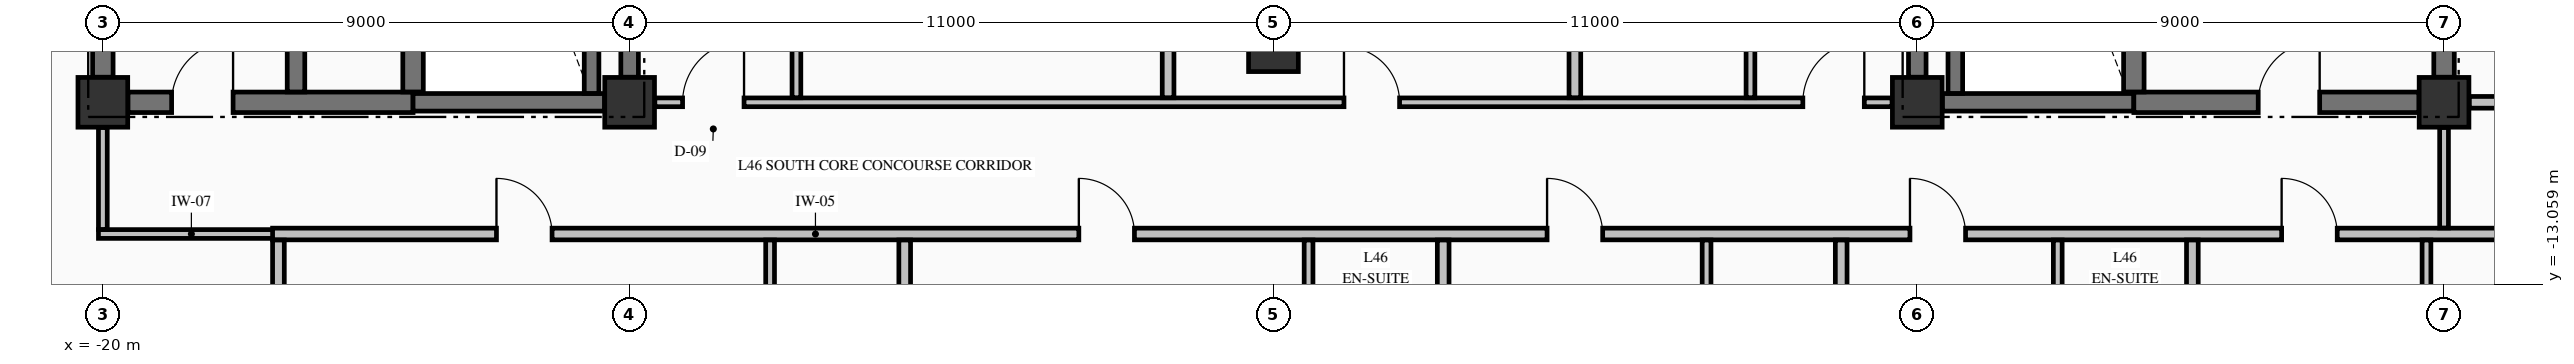
"""IFC4 building model, lengths in metres.
Left out: names, types, materials, properties, quantities, classifications, styles, units other than length and angle.
Written with IfcOpenShell. Run it as: python <this file> out.ifc"""

import sys

from ifc_helpers import new_model, si_unit, direction, frame, frame_2d, origin, origin_2d, place, context, subcontext, project, spatial, rectangle, extrude, element, fill, save


model = new_model("IFC4")
c1 = context("Model", 3, precision=1e-05, world=origin(), true_north=direction((0.0, 1.0)))
c2 = subcontext(c1, "Body", "Model", "MODEL_VIEW")
j1 = project(units=[si_unit("LENGTHUNIT", "METRE"), si_unit("PLANEANGLEUNIT", "RADIAN")], contexts=[c1])
p1 = place(None, origin())
s1 = spatial("IfcSite", under=j1, at=p1, CompositionType="ELEMENT")
p2 = place(p1, origin())
s2 = spatial("IfcBuilding", under=s1, at=p2, CompositionType="ELEMENT")
p3 = place(p2, frame((0.0, 0.0, 179.66)))
s3 = spatial("IfcBuildingStorey", under=s2, at=p3, CompositionType="ELEMENT", Elevation=179.66)
for number, where, z_axis, x_axis in (
    (1, (-20.0, -9.95, -0.25), (0.0, 0.0, 1.0), (1.0, 0.0, 0.0)),
    (2, (-11.0, -9.95, -0.25), (0.0, 0.0, 1.0), (1.0, 0.0, 0.0)),
    (3, (11.0, -9.95, -0.25), (0.0, 0.0, 1.0), (1.0, 0.0, 0.0)),
    (4, (20.0, -9.95, -0.25), (0.0, 0.0, 1.0), (1.0, 0.0, 0.0)),
    (5, (0.0, -9.0, -0.25), (0.0, 0.0, 1.0), (1.0, 0.0, 0.0)),
):
    element("IfcColumn", number, at=place(p3, frame(where, z_axis=z_axis, x_axis=x_axis)), inside=s3, PredefinedType="COLUMN", context=c2, shape_type="SweptSolid", body=[
        extrude(rectangle(XDim=0.85, YDim=0.85, at=origin_2d()), origin(), (0.0, 0.0, 1.0), 3.4),
    ])
p4 = place(p3, frame((-19.571, -9.95, 0.0), z_axis=(0.0, 0.0, 1.0), x_axis=(1.0, 0.0, 0.0)))
e6 = element("IfcWall", 6, at=p4, inside=s3, PredefinedType="SHEAR", context=c2, shape_type="SweptSolid", body=[
    extrude(rectangle(XDim=4.871, YDim=0.35, at=frame_2d((2.436, 0.0))), origin(), (0.0, 0.0, 1.0), 3.15),
])
p5 = place(p4, frame((0.746, 0.0, 0.0)))
e7 = element("IfcOpeningElement", 7, at=p5, cuts=e6, PredefinedType="OPENING", context=c2, shape_type="SweptSolid", body=[
    extrude(rectangle(XDim=1.05, YDim=2.15, at=frame_2d((0.525, 1.075))), frame((0.0, 0.185, 0.0), z_axis=(0.0, -1.0, 0.0), x_axis=(1.0, 0.0, 0.0)), (0.0, 0.0, 1.0), 0.37),
])
for number, where, z_axis, x_axis in (
    (8, (-14.7, -9.95, 0.0), (0.0, 0.0, 1.0), (1.0, 0.0, 0.0)),
    (9, (11.429, -9.95, 0.0), (0.0, 0.0, 1.0), (1.0, 0.0, 0.0)),
):
    element("IfcWall", number, at=place(p3, frame(where, z_axis=z_axis, x_axis=x_axis)), inside=s3, PredefinedType="SHEAR", context=c2, shape_type="SweptSolid", body=[
        extrude(rectangle(XDim=3.271, YDim=0.3, at=frame_2d((1.635, 0.0))), origin(), (0.0, 0.0, 1.0), 3.15),
    ])
p6 = place(p3, frame((14.7, -9.95, 0.0), z_axis=(0.0, 0.0, 1.0), x_axis=(1.0, 0.0, 0.0)))
e10 = element("IfcWall", 10, at=p6, inside=s3, PredefinedType="SHEAR", context=c2, shape_type="SweptSolid", body=[
    extrude(rectangle(XDim=4.871, YDim=0.35, at=frame_2d((2.436, 0.0))), origin(), (0.0, 0.0, 1.0), 3.15),
])
p7 = place(p6, frame((2.125, 0.0, 0.0)))
e11 = element("IfcOpeningElement", 11, at=p7, cuts=e10, PredefinedType="OPENING", context=c2, shape_type="SweptSolid", body=[
    extrude(rectangle(XDim=1.05, YDim=2.15, at=frame_2d((0.525, 1.075))), frame((0.0, 0.185, 0.0), z_axis=(0.0, -1.0, 0.0), x_axis=(1.0, 0.0, 0.0)), (0.0, 0.0, 1.0), 0.37),
])
p8 = place(p3, frame((-20.075, -12.2, 0.0), z_axis=(0.0, 0.0, 1.0), x_axis=(1.0, 0.0, 0.0)))
e12 = element("IfcWall", 12, at=p8, inside=s3, PredefinedType="PARTITIONING", context=c2, shape_type="SweptSolid", body=[
    extrude(rectangle(XDim=3.175, YDim=0.15, at=frame_2d((1.587, 0.0))), origin(), (0.0, 0.0, 1.0), 3.15),
])
p9 = place(p3, frame((-17.1, -12.2, 0.0), z_axis=(0.0, 0.0, 1.0), x_axis=(1.0, 0.0, 0.0)))
e13 = element("IfcWall", 13, at=p9, inside=s3, PredefinedType="PARTITIONING", context=c2, shape_type="SweptSolid", body=[
    extrude(rectangle(XDim=39.2, YDim=0.2, at=frame_2d((19.6, 0.0))), origin(), (0.0, 0.0, 1.0), 3.15),
])
p10 = place(p9, frame((3.825, 0.0, 0.0)))
e14 = element("IfcOpeningElement", 14, at=p10, cuts=e13, PredefinedType="OPENING", context=c2, shape_type="SweptSolid", body=[
    extrude(rectangle(XDim=0.95, YDim=2.15, at=frame_2d((0.475, 1.075))), frame((0.0, 0.11, 0.0), z_axis=(0.0, -1.0, 0.0), x_axis=(1.0, 0.0, 0.0)), (0.0, 0.0, 1.0), 0.22),
])
p11 = place(p9, frame((13.775, 0.0, 0.0)))
e15 = element("IfcOpeningElement", 15, at=p11, cuts=e13, PredefinedType="OPENING", context=c2, shape_type="SweptSolid", body=[
    extrude(rectangle(XDim=0.95, YDim=2.15, at=frame_2d((0.475, 1.075))), frame((0.0, 0.11, 0.0), z_axis=(0.0, -1.0, 0.0), x_axis=(1.0, 0.0, 0.0)), (0.0, 0.0, 1.0), 0.22),
])
p12 = place(p9, frame((21.775, 0.0, 0.0)))
e16 = element("IfcOpeningElement", 16, at=p12, cuts=e13, PredefinedType="OPENING", context=c2, shape_type="SweptSolid", body=[
    extrude(rectangle(XDim=0.95, YDim=2.15, at=frame_2d((0.475, 1.075))), frame((0.0, 0.11, 0.0), z_axis=(0.0, -1.0, 0.0), x_axis=(1.0, 0.0, 0.0)), (0.0, 0.0, 1.0), 0.22),
])
p13 = place(p9, frame((27.975, 0.0, 0.0)))
e17 = element("IfcOpeningElement", 17, at=p13, cuts=e13, PredefinedType="OPENING", context=c2, shape_type="SweptSolid", body=[
    extrude(rectangle(XDim=0.95, YDim=2.15, at=frame_2d((0.475, 1.075))), frame((0.0, 0.11, 0.0), z_axis=(0.0, -1.0, 0.0), x_axis=(1.0, 0.0, 0.0)), (0.0, 0.0, 1.0), 0.22),
])
p14 = place(p9, frame((34.325, 0.0, 0.0)))
e18 = element("IfcOpeningElement", 18, at=p14, cuts=e13, PredefinedType="OPENING", context=c2, shape_type="SweptSolid", body=[
    extrude(rectangle(XDim=0.95, YDim=2.15, at=frame_2d((0.475, 1.075))), frame((0.0, 0.11, 0.0), z_axis=(0.0, -1.0, 0.0), x_axis=(1.0, 0.0, 0.0)), (0.0, 0.0, 1.0), 0.22),
])
p15 = place(p3, frame((-10.569, -9.95, 0.0), z_axis=(0.0, 0.0, 1.0), x_axis=(1.0, 0.0, 0.0)))
e19 = element("IfcWall", 19, at=p15, inside=s3, PredefinedType="PARTITIONING", context=c2, shape_type="SweptSolid", body=[
    extrude(rectangle(XDim=21.138, YDim=0.15, at=frame_2d((10.569, 0.0))), origin(), (0.0, 0.0, 1.0), 3.15),
])
p16 = place(p15, frame((0.474, 0.0, 0.0)))
e20 = element("IfcOpeningElement", 20, at=p16, cuts=e19, PredefinedType="OPENING", context=c2, shape_type="SweptSolid", body=[
    extrude(rectangle(XDim=1.05, YDim=2.15, at=frame_2d((0.525, 1.075))), frame((0.0, 0.085, 0.0), z_axis=(0.0, -1.0, 0.0), x_axis=(1.0, 0.0, 0.0)), (0.0, 0.0, 1.0), 0.17),
])
p17 = place(p15, frame((19.614, 0.0, 0.0)))
e21 = element("IfcOpeningElement", 21, at=p17, cuts=e19, PredefinedType="OPENING", context=c2, shape_type="SweptSolid", body=[
    extrude(rectangle(XDim=1.05, YDim=2.15, at=frame_2d((0.525, 1.075))), frame((0.0, 0.085, 0.0), z_axis=(0.0, -1.0, 0.0), x_axis=(1.0, 0.0, 0.0)), (0.0, 0.0, 1.0), 0.17),
])
p18 = place(p15, frame((11.774, 0.0, 0.0)))
e22 = element("IfcOpeningElement", 22, at=p18, cuts=e19, PredefinedType="OPENING", context=c2, shape_type="SweptSolid", body=[
    extrude(rectangle(XDim=0.95, YDim=2.15, at=frame_2d((0.475, 1.075))), frame((0.0, 0.085, 0.0), z_axis=(0.0, -1.0, 0.0), x_axis=(1.0, 0.0, 0.0)), (0.0, 0.0, 1.0), 0.17),
])
p19 = place(p3, frame((20.431, -9.95, 0.0), z_axis=(0.0, 0.0, 1.0), x_axis=(1.0, 0.0, 0.0)))
e23 = element("IfcWall", 23, at=p19, inside=s3, PredefinedType="PARTITIONING", context=c2, shape_type="SweptSolid", body=[
    extrude(rectangle(XDim=6.404, YDim=0.2, at=frame_2d((3.202, 0.0))), origin(), (0.0, 0.0, 1.0), 3.15),
])
p20 = place(p3, frame((-20.0, -9.521, 0.0), z_axis=(0.0, 0.0, 1.0), x_axis=(0.0, 1.0, 0.0)))
e24 = element("IfcWall", 24, at=p20, inside=s3, PredefinedType="SHEAR", context=c2, shape_type="SweptSolid", body=[
    extrude(rectangle(XDim=9.092, YDim=0.35, at=frame_2d((4.546, 0.0))), origin(), (0.0, 0.0, 1.0), 3.15),
])
p21 = place(p3, frame((-16.7, -9.773, 0.0), z_axis=(0.0, 0.0, 1.0), x_axis=(0.0, 1.0, 0.0)))
e25 = element("IfcWall", 25, at=p21, inside=s3, PredefinedType="SHEAR", context=c2, shape_type="SweptSolid", body=[
    extrude(rectangle(XDim=9.371, YDim=0.3, at=frame_2d((4.686, 0.0))), origin(), (0.0, 0.0, 1.0), 3.15),
])
p22 = place(p3, frame((-14.7, -9.773, 0.0), z_axis=(0.0, 0.0, 1.0), x_axis=(0.0, 1.0, 0.0)))
e26 = element("IfcWall", 26, at=p22, inside=s3, PredefinedType="SHEAR", context=c2, shape_type="SweptSolid", body=[
    extrude(rectangle(XDim=9.371, YDim=0.35, at=frame_2d((4.686, 0.0))), origin(), (0.0, 0.0, 1.0), 3.15),
])
p23 = place(p3, frame((-11.65, -9.798, 0.0), z_axis=(0.0, 0.0, 1.0), x_axis=(0.0, 1.0, 0.0)))
e27 = element("IfcWall", 27, at=p23, inside=s3, PredefinedType="SOLIDWALL", context=c2, shape_type="SweptSolid", body=[
    extrude(rectangle(XDim=9.396, YDim=0.25, at=frame_2d((4.698, 0.0))), origin(), (0.0, 0.0, 1.0), 3.15),
])
for number, where, z_axis, x_axis in (
    (28, (-11.0, -9.521, 0.0), (0.0, 0.0, 1.0), (0.0, 1.0, 0.0)),
    (29, (11.0, -9.521, 0.0), (0.0, 0.0, 1.0), (0.0, 1.0, 0.0)),
):
    element("IfcWall", number, at=place(p3, frame(where, z_axis=z_axis, x_axis=x_axis)), inside=s3, PredefinedType="SHEAR", context=c2, shape_type="SweptSolid", body=[
        extrude(rectangle(XDim=9.092, YDim=0.3, at=frame_2d((4.546, 0.0))), origin(), (0.0, 0.0, 1.0), 3.15),
    ])
p24 = place(p3, frame((11.65, -9.798, 0.0), z_axis=(0.0, 0.0, 1.0), x_axis=(0.0, 1.0, 0.0)))
e30 = element("IfcWall", 30, at=p24, inside=s3, PredefinedType="SOLIDWALL", context=c2, shape_type="SweptSolid", body=[
    extrude(rectangle(XDim=9.396, YDim=0.25, at=frame_2d((4.698, 0.0))), origin(), (0.0, 0.0, 1.0), 3.15),
])
p25 = place(p3, frame((14.7, -9.773, 0.0), z_axis=(0.0, 0.0, 1.0), x_axis=(0.0, 1.0, 0.0)))
e31 = element("IfcWall", 31, at=p25, inside=s3, PredefinedType="SHEAR", context=c2, shape_type="SweptSolid", body=[
    extrude(rectangle(XDim=9.371, YDim=0.35, at=frame_2d((4.686, 0.0))), origin(), (0.0, 0.0, 1.0), 3.15),
])
p26 = place(p3, frame((20.0, -9.521, 0.0), z_axis=(0.0, 0.0, 1.0), x_axis=(0.0, 1.0, 0.0)))
e32 = element("IfcWall", 32, at=p26, inside=s3, PredefinedType="SHEAR", context=c2, shape_type="SweptSolid", body=[
    extrude(rectangle(XDim=9.092, YDim=0.35, at=frame_2d((4.546, 0.0))), origin(), (0.0, 0.0, 1.0), 3.15),
])
p27 = place(p3, frame((-20.0, -12.122, 0.0), z_axis=(0.0, 0.0, 1.0), x_axis=(0.0, 1.0, 0.0)))
e33 = element("IfcWall", 33, at=p27, inside=s3, PredefinedType="PARTITIONING", context=c2, shape_type="SweptSolid", body=[
    extrude(rectangle(XDim=1.741, YDim=0.15, at=frame_2d((0.871, 0.0))), origin(), (0.0, 0.0, 1.0), 2.342),
])
p28 = place(p3, frame((-17.0, -18.994, 0.0), z_axis=(0.0, 0.0, 1.0), x_axis=(0.0, 1.0, 0.0)))
e34 = element("IfcWall", 34, at=p28, inside=s3, PredefinedType="PARTITIONING", context=c2, shape_type="SweptSolid", body=[
    extrude(rectangle(XDim=6.691, YDim=0.2, at=frame_2d((3.345, 0.0))), origin(), (0.0, 0.0, 1.0), 3.15),
])
p29 = place(p3, frame((-8.6, -14.372, 0.0), z_axis=(0.0, 0.0, 1.0), x_axis=(0.0, 1.0, 0.0)))
e35 = element("IfcWall", 35, at=p29, inside=s3, PredefinedType="PARTITIONING", context=c2, shape_type="SweptSolid", body=[
    extrude(rectangle(XDim=2.069, YDim=0.15, at=frame_2d((1.035, 0.0))), origin(), (0.0, 0.0, 1.0), 3.15),
])
p30 = place(p3, frame((-8.15, -9.872, 0.0), z_axis=(0.0, 0.0, 1.0), x_axis=(0.0, 1.0, 0.0)))
e36 = element("IfcWall", 36, at=p30, inside=s3, PredefinedType="PARTITIONING", context=c2, shape_type="SweptSolid", body=[
    extrude(rectangle(XDim=10.569, YDim=0.15, at=frame_2d((5.285, 0.0))), origin(), (0.0, 0.0, 1.0), 3.15),
])
p31 = place(p30, frame((4.802, 0.0, 0.0)))
e37 = element("IfcOpeningElement", 37, at=p31, cuts=e36, PredefinedType="OPENING", context=c2, shape_type="SweptSolid", body=[
    extrude(rectangle(XDim=1.0, YDim=2.15, at=frame_2d((0.5, 1.075))), frame((0.0, 0.085, 0.0), z_axis=(0.0, -1.0, 0.0), x_axis=(1.0, 0.0, 0.0)), (0.0, 0.0, 1.0), 0.17),
])
p32 = place(p3, frame((-6.3, -14.372, 0.0), z_axis=(0.0, 0.0, 1.0), x_axis=(0.0, 1.0, 0.0)))
e38 = element("IfcWall", 38, at=p32, inside=s3, PredefinedType="PARTITIONING", context=c2, shape_type="SweptSolid", body=[
    extrude(rectangle(XDim=2.069, YDim=0.2, at=frame_2d((1.035, 0.0))), origin(), (0.0, 0.0, 1.0), 3.15),
])
p33 = place(p3, frame((-1.8, -9.872, 0.0), z_axis=(0.0, 0.0, 1.0), x_axis=(0.0, 1.0, 0.0)))
e39 = element("IfcWall", 39, at=p33, inside=s3, PredefinedType="PARTITIONING", context=c2, shape_type="SweptSolid", body=[
    extrude(rectangle(XDim=4.569, YDim=0.2, at=frame_2d((2.285, 0.0))), origin(), (0.0, 0.0, 1.0), 3.15),
])
p34 = place(p3, frame((0.6, -15.072, 0.0), z_axis=(0.0, 0.0, 1.0), x_axis=(0.0, 1.0, 0.0)))
e40 = element("IfcWall", 40, at=p34, inside=s3, PredefinedType="PARTITIONING", context=c2, shape_type="SweptSolid", body=[
    extrude(rectangle(XDim=2.769, YDim=0.15, at=frame_2d((1.385, 0.0))), origin(), (0.0, 0.0, 1.0), 3.15),
])
p35 = place(p3, frame((2.9, -15.072, 0.0), z_axis=(0.0, 0.0, 1.0), x_axis=(0.0, 1.0, 0.0)))
e41 = element("IfcWall", 41, at=p35, inside=s3, PredefinedType="PARTITIONING", context=c2, shape_type="SweptSolid", body=[
    extrude(rectangle(XDim=2.769, YDim=0.2, at=frame_2d((1.385, 0.0))), origin(), (0.0, 0.0, 1.0), 3.15),
])
p36 = place(p3, frame((5.15, -9.872, 0.0), z_axis=(0.0, 0.0, 1.0), x_axis=(0.0, 1.0, 0.0)))
e42 = element("IfcWall", 42, at=p36, inside=s3, PredefinedType="PARTITIONING", context=c2, shape_type="SweptSolid", body=[
    extrude(rectangle(XDim=4.569, YDim=0.2, at=frame_2d((2.285, 0.0))), origin(), (0.0, 0.0, 1.0), 3.15),
])
p37 = place(p3, frame((7.4, -14.372, 0.0), z_axis=(0.0, 0.0, 1.0), x_axis=(0.0, 1.0, 0.0)))
e43 = element("IfcWall", 43, at=p37, inside=s3, PredefinedType="PARTITIONING", context=c2, shape_type="SweptSolid", body=[
    extrude(rectangle(XDim=2.069, YDim=0.15, at=frame_2d((1.035, 0.0))), origin(), (0.0, 0.0, 1.0), 3.15),
])
p38 = place(p3, frame((8.15, -9.872, 0.0), z_axis=(0.0, 0.0, 1.0), x_axis=(0.0, 1.0, 0.0)))
e44 = element("IfcWall", 44, at=p38, inside=s3, PredefinedType="PARTITIONING", context=c2, shape_type="SweptSolid", body=[
    extrude(rectangle(XDim=4.569, YDim=0.15, at=frame_2d((2.285, 0.0))), origin(), (0.0, 0.0, 1.0), 3.15),
])
p39 = place(p38, frame((1.847, 0.0, 0.0)))
e45 = element("IfcOpeningElement", 45, at=p39, cuts=e44, PredefinedType="OPENING", context=c2, shape_type="SweptSolid", body=[
    extrude(rectangle(XDim=0.95, YDim=2.15, at=frame_2d((0.475, 1.075))), frame((0.0, 0.085, 0.0), z_axis=(0.0, -1.0, 0.0), x_axis=(1.0, 0.0, 0.0)), (0.0, 0.0, 1.0), 0.17),
])
p40 = place(p3, frame((9.7, -14.372, 0.0), z_axis=(0.0, 0.0, 1.0), x_axis=(0.0, 1.0, 0.0)))
e46 = element("IfcWall", 46, at=p40, inside=s3, PredefinedType="PARTITIONING", context=c2, shape_type="SweptSolid", body=[
    extrude(rectangle(XDim=2.069, YDim=0.2, at=frame_2d((1.035, 0.0))), origin(), (0.0, 0.0, 1.0), 3.15),
])
p41 = place(p3, frame((13.4, -15.072, 0.0), z_axis=(0.0, 0.0, 1.0), x_axis=(0.0, 1.0, 0.0)))
e47 = element("IfcWall", 47, at=p41, inside=s3, PredefinedType="PARTITIONING", context=c2, shape_type="SweptSolid", body=[
    extrude(rectangle(XDim=2.769, YDim=0.15, at=frame_2d((1.385, 0.0))), origin(), (0.0, 0.0, 1.0), 3.15),
])
p42 = place(p3, frame((15.7, -15.072, 0.0), z_axis=(0.0, 0.0, 1.0), x_axis=(0.0, 1.0, 0.0)))
e48 = element("IfcWall", 48, at=p42, inside=s3, PredefinedType="PARTITIONING", context=c2, shape_type="SweptSolid", body=[
    extrude(rectangle(XDim=2.769, YDim=0.2, at=frame_2d((1.385, 0.0))), origin(), (0.0, 0.0, 1.0), 3.15),
])
p43 = place(p3, frame((19.7, -14.372, 0.0), z_axis=(0.0, 0.0, 1.0), x_axis=(0.0, 1.0, 0.0)))
e49 = element("IfcWall", 49, at=p43, inside=s3, PredefinedType="PARTITIONING", context=c2, shape_type="SweptSolid", body=[
    extrude(rectangle(XDim=2.069, YDim=0.15, at=frame_2d((1.035, 0.0))), origin(), (0.0, 0.0, 1.0), 2.342),
])
p44 = place(p3, frame((20.0, -12.097, 0.0), z_axis=(0.0, 0.0, 1.0), x_axis=(0.0, 1.0, 0.0)))
e50 = element("IfcWall", 50, at=p44, inside=s3, PredefinedType="PARTITIONING", context=c2, shape_type="SweptSolid", body=[
    extrude(rectangle(XDim=1.716, YDim=0.15, at=frame_2d((0.858, 0.0))), origin(), (0.0, 0.0, 1.0), 2.342),
])
p45 = place(p5, origin())
e51 = element("IfcDoor", 51, at=p45, inside=s3, OperationType="SINGLE_SWING_RIGHT", PredefinedType="DOOR", context=c2, shape_type="SweptSolid", body=[
    extrude(rectangle(XDim=1.05, YDim=2.15, at=frame_2d((0.525, 1.075))), frame((0.0, 0.025, 0.0), z_axis=(0.0, -1.0, 0.0), x_axis=(1.0, 0.0, 0.0)), (0.0, 0.0, 1.0), 0.05),
])
fill(e7, e51)
p46 = place(p7, origin())
e52 = element("IfcDoor", 52, at=p46, inside=s3, OperationType="SINGLE_SWING_RIGHT", PredefinedType="DOOR", context=c2, shape_type="SweptSolid", body=[
    extrude(rectangle(XDim=1.05, YDim=2.15, at=frame_2d((0.525, 1.075))), frame((0.0, 0.025, 0.0), z_axis=(0.0, -1.0, 0.0), x_axis=(1.0, 0.0, 0.0)), (0.0, 0.0, 1.0), 0.05),
])
fill(e11, e52)
p47 = place(p16, origin())
e53 = element("IfcDoor", 53, at=p47, inside=s3, OperationType="SINGLE_SWING_RIGHT", PredefinedType="DOOR", context=c2, shape_type="SweptSolid", body=[
    extrude(rectangle(XDim=1.05, YDim=2.15, at=frame_2d((0.525, 1.075))), frame((0.0, 0.025, 0.0), z_axis=(0.0, -1.0, 0.0), x_axis=(1.0, 0.0, 0.0)), (0.0, 0.0, 1.0), 0.05),
])
fill(e20, e53)
p48 = place(p17, origin())
e54 = element("IfcDoor", 54, at=p48, inside=s3, OperationType="SINGLE_SWING_RIGHT", PredefinedType="DOOR", context=c2, shape_type="SweptSolid", body=[
    extrude(rectangle(XDim=1.05, YDim=2.15, at=frame_2d((0.525, 1.075))), frame((0.0, 0.025, 0.0), z_axis=(0.0, -1.0, 0.0), x_axis=(1.0, 0.0, 0.0)), (0.0, 0.0, 1.0), 0.05),
])
fill(e21, e54)
p49 = place(p10, origin())
e55 = element("IfcDoor", 55, at=p49, inside=s3, OperationType="SINGLE_SWING_LEFT", PredefinedType="DOOR", context=c2, shape_type="SweptSolid", body=[
    extrude(rectangle(XDim=0.95, YDim=2.15, at=frame_2d((0.475, 1.075))), frame((0.0, 0.025, 0.0), z_axis=(0.0, -1.0, 0.0), x_axis=(1.0, 0.0, 0.0)), (0.0, 0.0, 1.0), 0.05),
])
fill(e14, e55)
p50 = place(p11, origin())
e56 = element("IfcDoor", 56, at=p50, inside=s3, OperationType="SINGLE_SWING_LEFT", PredefinedType="DOOR", context=c2, shape_type="SweptSolid", body=[
    extrude(rectangle(XDim=0.95, YDim=2.15, at=frame_2d((0.475, 1.075))), frame((0.0, 0.025, 0.0), z_axis=(0.0, -1.0, 0.0), x_axis=(1.0, 0.0, 0.0)), (0.0, 0.0, 1.0), 0.05),
])
fill(e15, e56)
p51 = place(p12, origin())
e57 = element("IfcDoor", 57, at=p51, inside=s3, OperationType="SINGLE_SWING_LEFT", PredefinedType="DOOR", context=c2, shape_type="SweptSolid", body=[
    extrude(rectangle(XDim=0.95, YDim=2.15, at=frame_2d((0.475, 1.075))), frame((0.0, 0.025, 0.0), z_axis=(0.0, -1.0, 0.0), x_axis=(1.0, 0.0, 0.0)), (0.0, 0.0, 1.0), 0.05),
])
fill(e16, e57)
p52 = place(p13, origin())
e58 = element("IfcDoor", 58, at=p52, inside=s3, OperationType="SINGLE_SWING_LEFT", PredefinedType="DOOR", context=c2, shape_type="SweptSolid", body=[
    extrude(rectangle(XDim=0.95, YDim=2.15, at=frame_2d((0.475, 1.075))), frame((0.0, 0.025, 0.0), z_axis=(0.0, -1.0, 0.0), x_axis=(1.0, 0.0, 0.0)), (0.0, 0.0, 1.0), 0.05),
])
fill(e17, e58)
p53 = place(p14, origin())
e59 = element("IfcDoor", 59, at=p53, inside=s3, OperationType="SINGLE_SWING_LEFT", PredefinedType="DOOR", context=c2, shape_type="SweptSolid", body=[
    extrude(rectangle(XDim=0.95, YDim=2.15, at=frame_2d((0.475, 1.075))), frame((0.0, 0.025, 0.0), z_axis=(0.0, -1.0, 0.0), x_axis=(1.0, 0.0, 0.0)), (0.0, 0.0, 1.0), 0.05),
])
fill(e18, e59)
p54 = place(p18, origin())
e60 = element("IfcDoor", 60, at=p54, inside=s3, OperationType="SINGLE_SWING_LEFT", PredefinedType="DOOR", context=c2, shape_type="SweptSolid", body=[
    extrude(rectangle(XDim=0.95, YDim=2.15, at=frame_2d((0.475, 1.075))), frame((0.0, 0.025, 0.0), z_axis=(0.0, -1.0, 0.0), x_axis=(1.0, 0.0, 0.0)), (0.0, 0.0, 1.0), 0.05),
])
fill(e22, e60)
save(model, sys.argv[1])
